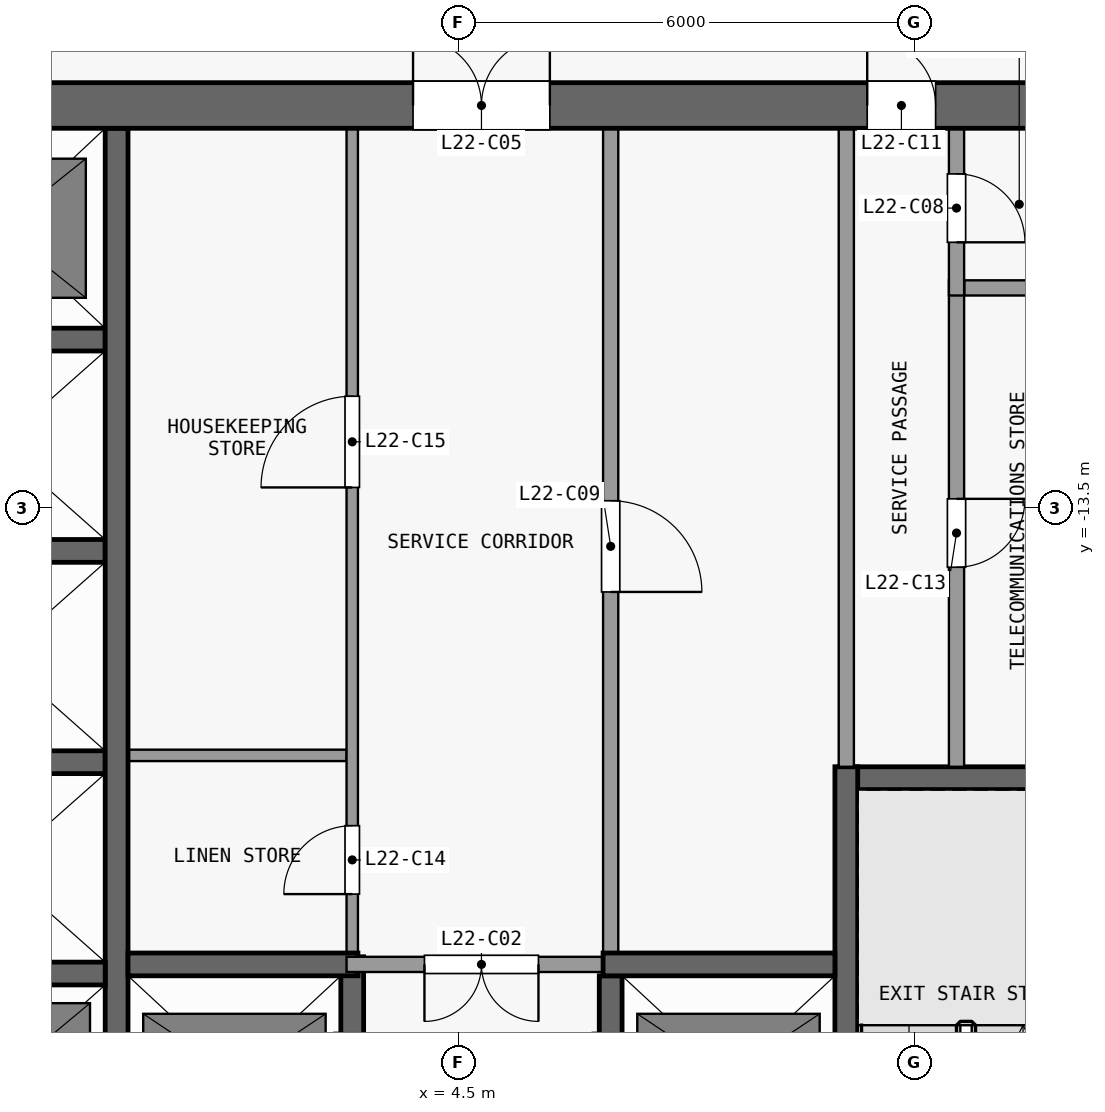
"""IFC4 building model, lengths in metres.
Left out: names, types, materials, properties, quantities, classifications, styles, units other than length and angle.
Written with IfcOpenShell. Run it as: python <this file> out.ifc"""

import sys

from ifc_helpers import new_model, si_unit, direction, frame, frame_2d, origin, place, context, subcontext, project, spatial, rectangle, extrude, element, fill, save


model = new_model("IFC4")
c1 = context("Model", 3, precision=1e-05, world=origin(), true_north=direction((0.0, 1.0)))
c2 = subcontext(c1, "Body", "Model", "MODEL_VIEW")
j1 = project(units=[si_unit("LENGTHUNIT", "METRE"), si_unit("PLANEANGLEUNIT", "RADIAN")], contexts=[c1])
p1 = place(None, origin())
s1 = spatial("IfcSite", under=j1, at=p1, CompositionType="ELEMENT")
p2 = place(p1, origin())
s2 = spatial("IfcBuilding", under=s1, at=p2, CompositionType="ELEMENT")
p3 = place(p2, frame((0.0, 0.0, 91.9)))
s3 = spatial("IfcBuildingStorey", under=s2, at=p3, CompositionType="ELEMENT", Elevation=91.9)
p4 = place(p3, frame((-13.4, -8.2, 0.0), z_axis=(0.0, 0.0, 1.0), x_axis=(1.0, 0.0, 0.0)))
e1 = element("IfcWall", 1, at=p4, inside=s3, PredefinedType="SHEAR", context=c2, shape_type="SweptSolid", body=[
    extrude(rectangle(XDim=26.8, YDim=0.6, at=frame_2d((13.4, 0.0))), origin(), (0.0, 0.0, 1.0), 3.3),
])
p5 = place(p4, frame((7.7, 0.0, 0.0)))
e2 = element("IfcOpeningElement", 2, at=p5, cuts=e1, PredefinedType="OPENING", context=c2, shape_type="SweptSolid", body=[
    extrude(rectangle(XDim=1.8, YDim=2.1, at=frame_2d((0.9, 1.05))), frame((0.0, 0.31, 0.0), z_axis=(0.0, -1.0, 0.0), x_axis=(1.0, 0.0, 0.0)), (0.0, 0.0, 1.0), 0.62),
])
p6 = place(p4, frame((17.3, 0.0, 0.0)))
e3 = element("IfcOpeningElement", 3, at=p6, cuts=e1, PredefinedType="OPENING", context=c2, shape_type="SweptSolid", body=[
    extrude(rectangle(XDim=1.8, YDim=2.1, at=frame_2d((0.9, 1.05))), frame((0.0, 0.31, 0.0), z_axis=(0.0, -1.0, 0.0), x_axis=(1.0, 0.0, 0.0)), (0.0, 0.0, 1.0), 0.62),
])
p7 = place(p4, frame((2.625, 0.0, 0.0)))
e4 = element("IfcOpeningElement", 4, at=p7, cuts=e1, PredefinedType="OPENING", context=c2, shape_type="SweptSolid", body=[
    extrude(rectangle(XDim=0.9, YDim=2.1, at=frame_2d((0.45, 1.05))), frame((0.0, 0.31, 0.0), z_axis=(0.0, -1.0, 0.0), x_axis=(1.0, 0.0, 0.0)), (0.0, 0.0, 1.0), 0.62),
])
p8 = place(p4, frame((23.275, 0.0, 0.0)))
e5 = element("IfcOpeningElement", 5, at=p8, cuts=e1, PredefinedType="OPENING", context=c2, shape_type="SweptSolid", body=[
    extrude(rectangle(XDim=0.9, YDim=2.1, at=frame_2d((0.45, 1.05))), frame((0.0, 0.31, 0.0), z_axis=(0.0, -1.0, 0.0), x_axis=(1.0, 0.0, 0.0)), (0.0, 0.0, 1.0), 0.62),
])
p9 = place(p3, frame((-2.95, -19.62, 0.0), z_axis=(0.0, 0.0, 1.0), x_axis=(1.0, 0.0, 0.0)))
e6 = element("IfcWall", 6, at=p9, inside=s3, PredefinedType="SHEAR", context=c2, shape_type="SweptSolid", body=[
    extrude(rectangle(XDim=2.8, YDim=0.3, at=frame_2d((1.4, 0.0))), origin(), (0.0, 0.0, 1.0), 3.3),
])
p10 = place(p3, frame((0.15, -19.5, 0.0), z_axis=(0.0, 0.0, 1.0), x_axis=(1.0, 0.0, 0.0)))
e7 = element("IfcWall", 7, at=p10, inside=s3, PredefinedType="SHEAR", context=c2, shape_type="SweptSolid", body=[
    extrude(rectangle(XDim=3.025, YDim=0.3, at=frame_2d((1.513, 0.0))), origin(), (0.0, 0.0, 1.0), 3.3),
])
p11 = place(p3, frame((6.4, -19.5, 0.0), z_axis=(0.0, 0.0, 1.0), x_axis=(-1.0, 0.0, 0.0)))
e8 = element("IfcWall", 8, at=p11, inside=s3, PredefinedType="PARTITIONING", context=c2, shape_type="SweptSolid", body=[
    extrude(rectangle(XDim=3.375, YDim=0.2, at=frame_2d((1.688, 0.0))), origin(), (0.0, 0.0, 1.0), 3.3),
])
p12 = place(p11, frame((0.85, 0.0, 0.0)))
e9 = element("IfcOpeningElement", 9, at=p12, cuts=e8, PredefinedType="OPENING", context=c2, shape_type="SweptSolid", body=[
    extrude(rectangle(XDim=1.5, YDim=2.1, at=frame_2d((0.75, 1.05))), frame((0.0, 0.11, 0.0), z_axis=(0.0, -1.0, 0.0), x_axis=(1.0, 0.0, 0.0)), (0.0, 0.0, 1.0), 0.22),
])
p13 = place(p3, frame((6.4, -19.5, 0.0), z_axis=(0.0, 0.0, 1.0), x_axis=(1.0, 0.0, 0.0)))
e10 = element("IfcWall", 10, at=p13, inside=s3, PredefinedType="SHEAR", context=c2, shape_type="SweptSolid", body=[
    extrude(rectangle(XDim=3.05, YDim=0.3, at=frame_2d((1.525, 0.0))), origin(), (0.0, 0.0, 1.0), 3.3),
])
p14 = place(p3, frame((9.5, -17.05, 0.0), z_axis=(0.0, 0.0, 1.0), x_axis=(1.0, 0.0, 0.0)))
e11 = element("IfcWall", 11, at=p14, inside=s3, PredefinedType="SHEAR", context=c2, shape_type="SweptSolid", body=[
    extrude(rectangle(XDim=3.1, YDim=0.3, at=frame_2d((1.55, 0.0))), origin(), (0.0, 0.0, 1.0), 3.3),
])
p15 = place(p3, frame((-2.95, -16.84, 0.0), z_axis=(0.0, 0.0, 1.0), x_axis=(1.0, 0.0, 0.0)))
e12 = element("IfcWall", 12, at=p15, inside=s3, PredefinedType="SHEAR", context=c2, shape_type="SweptSolid", body=[
    extrude(rectangle(XDim=2.8, YDim=0.3, at=frame_2d((1.4, 0.0))), origin(), (0.0, 0.0, 1.0), 3.3),
])
p16 = place(p3, frame((0.15, -16.75, 0.0), z_axis=(0.0, 0.0, 1.0), x_axis=(1.0, 0.0, 0.0)))
e13 = element("IfcWall", 13, at=p16, inside=s3, PredefinedType="PARTITIONING", context=c2, shape_type="SweptSolid", body=[
    extrude(rectangle(XDim=2.875, YDim=0.15, at=frame_2d((1.438, 0.0))), origin(), (0.0, 0.0, 1.0), 3.3),
])
for number, where, z_axis, x_axis in (
    (14, (-2.95, -14.06, 0.0), (0.0, 0.0, 1.0), (1.0, 0.0, 0.0)),
    (15, (-2.95, -11.28, 0.0), (0.0, 0.0, 1.0), (1.0, 0.0, 0.0)),
):
    element("IfcWall", number, at=place(p3, frame(where, z_axis=z_axis, x_axis=x_axis)), inside=s3, PredefinedType="SHEAR", context=c2, shape_type="SweptSolid", body=[
        extrude(rectangle(XDim=2.8, YDim=0.3, at=frame_2d((1.4, 0.0))), origin(), (0.0, 0.0, 1.0), 3.3),
    ])
p17 = place(p3, frame((11.15, -10.6, 0.0), z_axis=(0.0, 0.0, 1.0), x_axis=(1.0, 0.0, 0.0)))
e16 = element("IfcWall", 16, at=p17, inside=s3, PredefinedType="PARTITIONING", context=c2, shape_type="SweptSolid", body=[
    extrude(rectangle(XDim=1.45, YDim=0.2, at=frame_2d((0.725, 0.0))), origin(), (0.0, 0.0, 1.0), 3.3),
])
p18 = place(p3, frame((0.0, -22.25, 0.0), z_axis=(0.0, 0.0, 1.0), x_axis=(0.0, 1.0, 0.0)))
e17 = element("IfcWall", 17, at=p18, inside=s3, PredefinedType="SHEAR", context=c2, shape_type="SweptSolid", body=[
    extrude(rectangle(XDim=13.75, YDim=0.3, at=frame_2d((6.875, 0.0))), origin(), (0.0, 0.0, 1.0), 3.3),
])
p19 = place(p3, frame((3.1, -22.25, 0.0), z_axis=(0.0, 0.0, 1.0), x_axis=(0.0, 1.0, 0.0)))
e18 = element("IfcWall", 18, at=p19, inside=s3, PredefinedType="SHEAR", context=c2, shape_type="SweptSolid", body=[
    extrude(rectangle(XDim=2.85, YDim=0.3, at=frame_2d((1.425, 0.0))), origin(), (0.0, 0.0, 1.0), 3.3),
])
p20 = place(p19, frame((0.75, 0.0, 0.0)))
e19 = element("IfcOpeningElement", 19, at=p20, cuts=e18, PredefinedType="OPENING", context=c2, shape_type="SweptSolid", body=[
    extrude(rectangle(XDim=1.1, YDim=2.1, at=frame_2d((0.55, 1.05))), frame((0.0, 0.16, 0.0), z_axis=(0.0, -1.0, 0.0), x_axis=(1.0, 0.0, 0.0)), (0.0, 0.0, 1.0), 0.32),
])
p21 = place(p3, frame((3.1, -19.4, 0.0), z_axis=(0.0, 0.0, 1.0), x_axis=(0.0, 1.0, 0.0)))
e20 = element("IfcWall", 20, at=p21, inside=s3, PredefinedType="PARTITIONING", context=c2, shape_type="SweptSolid", body=[
    extrude(rectangle(XDim=10.9, YDim=0.15, at=frame_2d((5.45, 0.0))), origin(), (0.0, 0.0, 1.0), 3.3),
])
p22 = place(p21, frame((0.825, 0.0, 0.0)))
e21 = element("IfcOpeningElement", 21, at=p22, cuts=e20, PredefinedType="OPENING", context=c2, shape_type="SweptSolid", body=[
    extrude(rectangle(XDim=0.9, YDim=2.1, at=frame_2d((0.45, 1.05))), frame((0.0, 0.085, 0.0), z_axis=(0.0, -1.0, 0.0), x_axis=(1.0, 0.0, 0.0)), (0.0, 0.0, 1.0), 0.17),
])
p23 = place(p21, frame((6.175, 0.0, 0.0)))
e22 = element("IfcOpeningElement", 22, at=p23, cuts=e20, PredefinedType="OPENING", context=c2, shape_type="SweptSolid", body=[
    extrude(rectangle(XDim=1.2, YDim=2.1, at=frame_2d((0.6, 1.05))), frame((0.0, 0.085, 0.0), z_axis=(0.0, -1.0, 0.0), x_axis=(1.0, 0.0, 0.0)), (0.0, 0.0, 1.0), 0.17),
])
p24 = place(p3, frame((6.5, -22.25, 0.0), z_axis=(0.0, 0.0, 1.0), x_axis=(0.0, 1.0, 0.0)))
e23 = element("IfcWall", 23, at=p24, inside=s3, PredefinedType="SHEAR", context=c2, shape_type="SweptSolid", body=[
    extrude(rectangle(XDim=2.6, YDim=0.3, at=frame_2d((1.3, 0.0))), origin(), (0.0, 0.0, 1.0), 3.3),
])
p25 = place(p24, frame((0.75, 0.0, 0.0)))
e24 = element("IfcOpeningElement", 24, at=p25, cuts=e23, PredefinedType="OPENING", context=c2, shape_type="SweptSolid", body=[
    extrude(rectangle(XDim=1.1, YDim=2.1, at=frame_2d((0.55, 1.05))), frame((0.0, 0.16, 0.0), z_axis=(0.0, -1.0, 0.0), x_axis=(1.0, 0.0, 0.0)), (0.0, 0.0, 1.0), 0.32),
])
p26 = place(p3, frame((6.5, -8.5, 0.0), z_axis=(0.0, 0.0, 1.0), x_axis=(0.0, -1.0, 0.0)))
e25 = element("IfcWall", 25, at=p26, inside=s3, PredefinedType="PARTITIONING", context=c2, shape_type="SweptSolid", body=[
    extrude(rectangle(XDim=10.85, YDim=0.2, at=frame_2d((5.425, 0.0))), origin(), (0.0, 0.0, 1.0), 3.3),
])
p27 = place(p26, frame((4.9, 0.0, 0.0)))
e26 = element("IfcOpeningElement", 26, at=p27, cuts=e25, PredefinedType="OPENING", context=c2, shape_type="SweptSolid", body=[
    extrude(rectangle(XDim=1.2, YDim=2.1, at=frame_2d((0.6, 1.05))), frame((0.0, 0.11, 0.0), z_axis=(0.0, -1.0, 0.0), x_axis=(1.0, 0.0, 0.0)), (0.0, 0.0, 1.0), 0.22),
])
p28 = place(p3, frame((9.6, -16.9, 0.0), z_axis=(0.0, 0.0, 1.0), x_axis=(0.0, -1.0, 0.0)))
e27 = element("IfcWall", 27, at=p28, inside=s3, PredefinedType="SHEAR", context=c2, shape_type="SweptSolid", body=[
    extrude(rectangle(XDim=7.7, YDim=0.3, at=frame_2d((3.85, 0.0))), origin(), (0.0, 0.0, 1.0), 3.3),
])
p29 = place(p28, frame((6.5, 0.0, 0.0)))
e28 = element("IfcOpeningElement", 28, at=p29, cuts=e27, PredefinedType="OPENING", context=c2, shape_type="SweptSolid", body=[
    extrude(rectangle(XDim=1.1, YDim=2.1, at=frame_2d((0.55, 1.05))), frame((0.0, 0.16, 0.0), z_axis=(0.0, -1.0, 0.0), x_axis=(1.0, 0.0, 0.0)), (0.0, 0.0, 1.0), 0.32),
])
p30 = place(p3, frame((9.6, -16.9, 0.0), z_axis=(0.0, 0.0, 1.0), x_axis=(0.0, 1.0, 0.0)))
e29 = element("IfcWall", 29, at=p30, inside=s3, PredefinedType="PARTITIONING", context=c2, shape_type="SweptSolid", body=[
    extrude(rectangle(XDim=8.4, YDim=0.2, at=frame_2d((4.2, 0.0))), origin(), (0.0, 0.0, 1.0), 3.3),
])
p31 = place(p3, frame((11.05, -10.5, 0.0), z_axis=(0.0, 0.0, 1.0), x_axis=(0.0, -1.0, 0.0)))
e30 = element("IfcWall", 30, at=p31, inside=s3, PredefinedType="PARTITIONING", context=c2, shape_type="SweptSolid", body=[
    extrude(rectangle(XDim=6.4, YDim=0.2, at=frame_2d((3.2, 0.0))), origin(), (0.0, 0.0, 1.0), 3.3),
])
p32 = place(p31, frame((2.875, 0.0, 0.0)))
e31 = element("IfcOpeningElement", 31, at=p32, cuts=e30, PredefinedType="OPENING", context=c2, shape_type="SweptSolid", body=[
    extrude(rectangle(XDim=0.9, YDim=2.1, at=frame_2d((0.45, 1.05))), frame((0.0, 0.11, 0.0), z_axis=(0.0, -1.0, 0.0), x_axis=(1.0, 0.0, 0.0)), (0.0, 0.0, 1.0), 0.22),
])
p33 = place(p3, frame((11.05, -8.5, 0.0), z_axis=(0.0, 0.0, 1.0), x_axis=(0.0, -1.0, 0.0)))
e32 = element("IfcWall", 32, at=p33, inside=s3, PredefinedType="PARTITIONING", context=c2, shape_type="SweptSolid", body=[
    extrude(rectangle(XDim=2.2, YDim=0.2, at=frame_2d((1.1, 0.0))), origin(), (0.0, 0.0, 1.0), 3.3),
])
p34 = place(p33, frame((0.6, 0.0, 0.0)))
e33 = element("IfcOpeningElement", 33, at=p34, cuts=e32, PredefinedType="OPENING", context=c2, shape_type="SweptSolid", body=[
    extrude(rectangle(XDim=0.9, YDim=2.1, at=frame_2d((0.45, 1.05))), frame((0.0, 0.11, 0.0), z_axis=(0.0, -1.0, 0.0), x_axis=(1.0, 0.0, 0.0)), (0.0, 0.0, 1.0), 0.22),
])
p35 = place(p12, origin())
e34 = element("IfcDoor", 34, at=p35, inside=s3, OperationType="DOUBLE_DOOR_SINGLE_SWING", PredefinedType="DOOR", context=c2, shape_type="SweptSolid", body=[
    extrude(rectangle(XDim=1.5, YDim=2.1, at=frame_2d((0.75, 1.05))), frame((0.0, 0.025, 0.0), z_axis=(0.0, -1.0, 0.0), x_axis=(1.0, 0.0, 0.0)), (0.0, 0.0, 1.0), 0.05),
])
fill(e9, e34)
p36 = place(p6, origin())
e35 = element("IfcDoor", 35, at=p36, inside=s3, OperationType="DOUBLE_DOOR_SINGLE_SWING", PredefinedType="DOOR", context=c2, shape_type="SweptSolid", body=[
    extrude(rectangle(XDim=1.8, YDim=2.1, at=frame_2d((0.9, 1.05))), frame((0.0, 0.025, 0.0), z_axis=(0.0, -1.0, 0.0), x_axis=(1.0, 0.0, 0.0)), (0.0, 0.0, 1.0), 0.05),
])
fill(e3, e35)
p37 = place(p34, origin())
e36 = element("IfcDoor", 36, at=p37, inside=s3, OperationType="SINGLE_SWING_RIGHT", PredefinedType="DOOR", context=c2, shape_type="SweptSolid", body=[
    extrude(rectangle(XDim=0.9, YDim=2.1, at=frame_2d((0.45, 1.05))), frame((0.0, 0.025, 0.0), z_axis=(0.0, -1.0, 0.0), x_axis=(1.0, 0.0, 0.0)), (0.0, 0.0, 1.0), 0.05),
])
fill(e33, e36)
p38 = place(p27, origin())
e37 = element("IfcDoor", 37, at=p38, inside=s3, OperationType="SINGLE_SWING_RIGHT", PredefinedType="DOOR", context=c2, shape_type="SweptSolid", body=[
    extrude(rectangle(XDim=1.2, YDim=2.1, at=frame_2d((0.6, 1.05))), frame((0.0, 0.025, 0.0), z_axis=(0.0, -1.0, 0.0), x_axis=(1.0, 0.0, 0.0)), (0.0, 0.0, 1.0), 0.05),
])
fill(e26, e37)
p39 = place(p8, origin())
e38 = element("IfcDoor", 38, at=p39, inside=s3, OperationType="SINGLE_SWING_LEFT", PredefinedType="DOOR", context=c2, shape_type="SweptSolid", body=[
    extrude(rectangle(XDim=0.9, YDim=2.1, at=frame_2d((0.45, 1.05))), frame((0.0, 0.025, 0.0), z_axis=(0.0, -1.0, 0.0), x_axis=(1.0, 0.0, 0.0)), (0.0, 0.0, 1.0), 0.05),
])
fill(e5, e38)
p40 = place(p32, origin())
e39 = element("IfcDoor", 39, at=p40, inside=s3, OperationType="SINGLE_SWING_LEFT", PredefinedType="DOOR", context=c2, shape_type="SweptSolid", body=[
    extrude(rectangle(XDim=0.9, YDim=2.1, at=frame_2d((0.45, 1.05))), frame((0.0, 0.025, 0.0), z_axis=(0.0, -1.0, 0.0), x_axis=(1.0, 0.0, 0.0)), (0.0, 0.0, 1.0), 0.05),
])
fill(e31, e39)
p41 = place(p22, origin())
e40 = element("IfcDoor", 40, at=p41, inside=s3, OperationType="SINGLE_SWING_LEFT", PredefinedType="DOOR", context=c2, shape_type="SweptSolid", body=[
    extrude(rectangle(XDim=0.9, YDim=2.1, at=frame_2d((0.45, 1.05))), frame((0.0, 0.025, 0.0), z_axis=(0.0, -1.0, 0.0), x_axis=(1.0, 0.0, 0.0)), (0.0, 0.0, 1.0), 0.05),
])
fill(e21, e40)
p42 = place(p23, origin())
e41 = element("IfcDoor", 41, at=p42, inside=s3, OperationType="SINGLE_SWING_LEFT", PredefinedType="DOOR", context=c2, shape_type="SweptSolid", body=[
    extrude(rectangle(XDim=1.2, YDim=2.1, at=frame_2d((0.6, 1.05))), frame((0.0, 0.025, 0.0), z_axis=(0.0, -1.0, 0.0), x_axis=(1.0, 0.0, 0.0)), (0.0, 0.0, 1.0), 0.05),
])
fill(e22, e41)
save(model, sys.argv[1])
